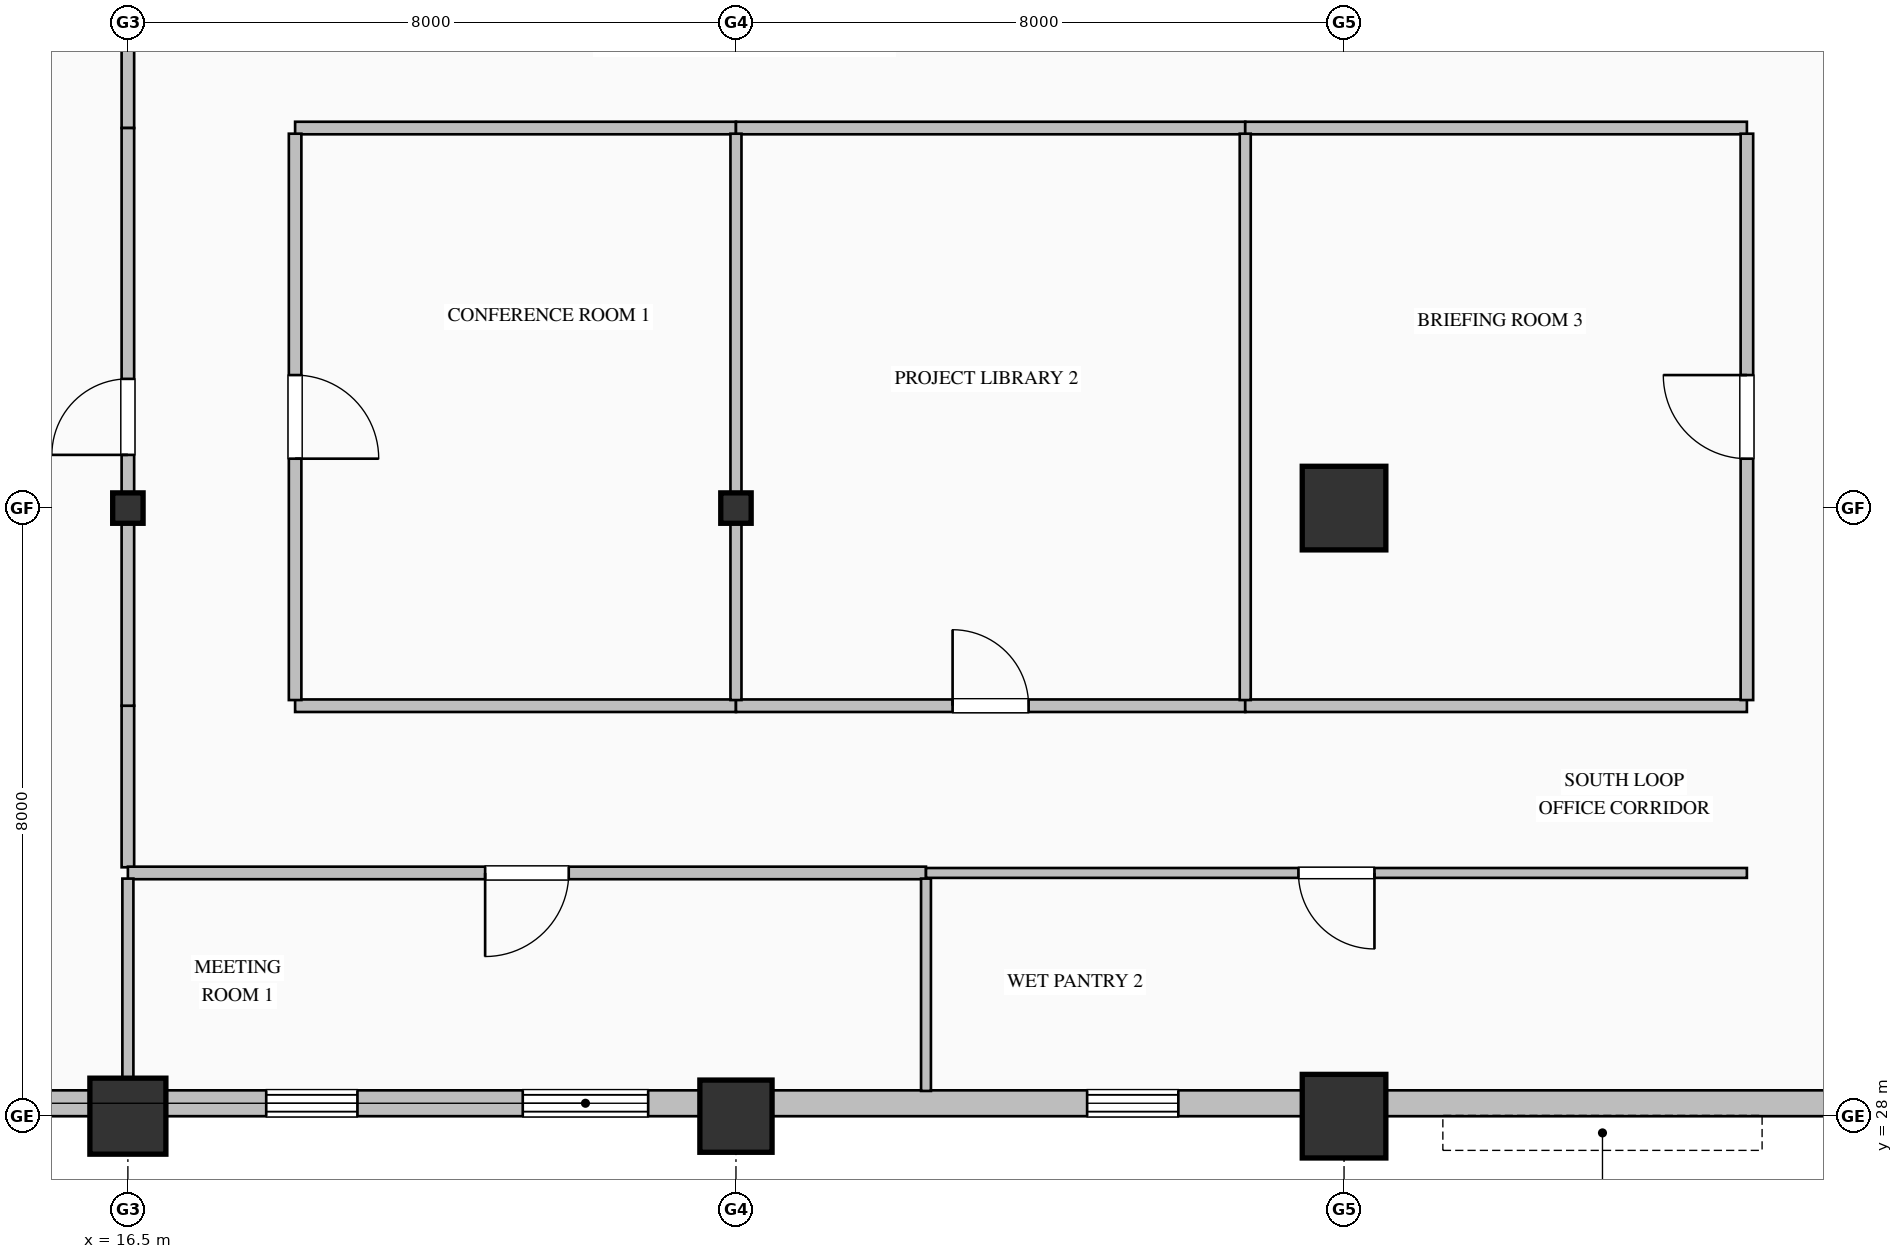
"""IFC4 building model, lengths in metres.
Left out: names, types, materials, properties, quantities, classifications, styles, units other than length and angle.
Written with IfcOpenShell. Run it as: python <this file> out.ifc"""

import sys

from ifc_helpers import new_model, si_unit, direction, frame, frame_2d, origin, origin_2d, place, context, subcontext, project, spatial, rectangle, hollow_rectangle, hollow_circle, i_section, extrude, element, fill, save


model = new_model("IFC4")
c1 = context("Model", 3, precision=1e-05, world=origin(), true_north=direction((0.0, 1.0)))
c2 = subcontext(c1, "Body", "Model", "MODEL_VIEW")
j1 = project(units=[si_unit("LENGTHUNIT", "METRE"), si_unit("PLANEANGLEUNIT", "RADIAN")], contexts=[c1])
p1 = place(None, origin())
s1 = spatial("IfcSite", under=j1, at=p1, CompositionType="ELEMENT")
p2 = place(p1, origin())
s2 = spatial("IfcBuilding", under=s1, at=p2, CompositionType="ELEMENT")
p3 = place(p2, frame((0.0, 0.0, 135.0)))
s3 = spatial("IfcBuildingStorey", under=s2, at=p3, CompositionType="ELEMENT", Elevation=135.0)
p4 = place(p3, frame((16.5, 28.0, 0.0), z_axis=(0.0, 0.0, 1.0), x_axis=(1.0, 0.0, 0.0)))
e1 = element("IfcColumn", 1, at=p4, inside=s3, PredefinedType="COLUMN", context=c2, shape_type="SweptSolid", body=[
    extrude(hollow_circle(Radius=0.5, WallThickness=0.036, at=origin_2d()), origin(), (0.0, 0.0, 1.0), 4.0),
])
p5 = place(p3, frame((16.5, 36.0, 0.0), z_axis=(0.0, 0.0, 1.0), x_axis=(1.0, 0.0, 0.0)))
e2 = element("IfcColumn", 2, at=p5, inside=s3, PredefinedType="COLUMN", context=c2, shape_type="SweptSolid", body=[
    extrude(i_section(OverallWidth=0.4, OverallDepth=0.4, WebThickness=0.013, FlangeThickness=0.021, FilletRadius=0.022, at=origin_2d()), origin(), (0.0, 0.0, 1.0), 4.0),
])
p6 = place(p3, frame((24.5, 28.0, 0.0), z_axis=(0.0, 0.0, 1.0), x_axis=(1.0, 0.0, 0.0)))
e3 = element("IfcColumn", 3, at=p6, inside=s3, PredefinedType="COLUMN", context=c2, shape_type="SweptSolid", body=[
    extrude(hollow_rectangle(XDim=0.95, YDim=0.95, WallThickness=0.036, at=origin_2d()), origin(), (0.0, 0.0, 1.0), 4.0),
])
p7 = place(p3, frame((24.5, 36.0, 0.0), z_axis=(0.0, 0.0, 1.0), x_axis=(1.0, 0.0, 0.0)))
e4 = element("IfcColumn", 4, at=p7, inside=s3, PredefinedType="COLUMN", context=c2, shape_type="SweptSolid", body=[
    extrude(i_section(OverallWidth=0.4, OverallDepth=0.4, WebThickness=0.013, FlangeThickness=0.021, FilletRadius=0.022, at=origin_2d()), origin(), (0.0, 0.0, 1.0), 4.0),
])
for number, where, z_axis, x_axis in (
    (5, (32.5, 28.0, 0.0), (0.0, 0.0, 1.0), (1.0, 0.0, 0.0)),
    (6, (32.5, 36.0, 0.0), (0.0, 0.0, 1.0), (1.0, 0.0, 0.0)),
):
    element("IfcColumn", number, at=place(p3, frame(where, z_axis=z_axis, x_axis=x_axis)), inside=s3, PredefinedType="COLUMN", context=c2, shape_type="SweptSolid", body=[
        extrude(hollow_rectangle(XDim=1.1, YDim=1.1, WallThickness=0.04, at=origin_2d()), origin(), (0.0, 0.0, 1.0), 4.0),
    ])
p8 = place(p3, frame((40.52, 28.17, 0.0), z_axis=(0.0, 0.0, 1.0), x_axis=(-1.0, 0.0, 0.0)))
e7 = element("IfcWall", 7, at=p8, inside=s3, PredefinedType="SOLIDWALL", context=c2, shape_type="SweptSolid", body=[
    extrude(rectangle(XDim=27.52, YDim=0.34, at=frame_2d((13.76, 0.0))), origin(), (0.0, 0.0, 1.0), 3.165),
])
p9 = place(p8, frame((10.2, 0.0, 0.7)))
e8 = element("IfcOpeningElement", 8, at=p9, cuts=e7, PredefinedType="OPENING", context=c2, shape_type="SweptSolid", body=[
    extrude(rectangle(XDim=1.2, YDim=1.85, at=frame_2d((0.6, 0.925))), frame((0.0, 0.18, 0.0), z_axis=(0.0, -1.0, 0.0), x_axis=(1.0, 0.0, 0.0)), (0.0, 0.0, 1.0), 0.36),
])
p10 = place(p8, frame((17.175, 0.0, 0.85)))
e9 = element("IfcOpeningElement", 9, at=p10, cuts=e7, PredefinedType="OPENING", context=c2, shape_type="SweptSolid", body=[
    extrude(rectangle(XDim=1.65, YDim=1.95, at=frame_2d((0.825, 0.975))), frame((0.0, 0.18, 0.0), z_axis=(0.0, -1.0, 0.0), x_axis=(1.0, 0.0, 0.0)), (0.0, 0.0, 1.0), 0.36),
])
p11 = place(p8, frame((21.0, 0.0, 0.7)))
e10 = element("IfcOpeningElement", 10, at=p11, cuts=e7, PredefinedType="OPENING", context=c2, shape_type="SweptSolid", body=[
    extrude(rectangle(XDim=1.2, YDim=1.85, at=frame_2d((0.6, 0.925))), frame((0.0, 0.18, 0.0), z_axis=(0.0, -1.0, 0.0), x_axis=(1.0, 0.0, 0.0)), (0.0, 0.0, 1.0), 0.36),
])
p12 = place(p3, frame((18.7, 33.4, 0.0), z_axis=(0.0, 0.0, 1.0), x_axis=(1.0, 0.0, 0.0)))
e11 = element("IfcWall", 11, at=p12, inside=s3, PredefinedType="PARTITIONING", context=c2, shape_type="SweptSolid", body=[
    extrude(rectangle(XDim=5.8, YDim=0.165, at=frame_2d((2.9, 0.0))), origin(), (0.0, 0.0, 1.0), 3.765),
])
p13 = place(p3, frame((24.5, 33.4, 0.0), z_axis=(0.0, 0.0, 1.0), x_axis=(1.0, 0.0, 0.0)))
e12 = element("IfcWall", 12, at=p13, inside=s3, PredefinedType="PARTITIONING", context=c2, shape_type="SweptSolid", body=[
    extrude(rectangle(XDim=6.7, YDim=0.165, at=frame_2d((3.35, 0.0))), origin(), (0.0, 0.0, 1.0), 3.765),
])
p14 = place(p13, frame((2.85, 0.0, 0.0)))
e13 = element("IfcOpeningElement", 13, at=p14, cuts=e12, PredefinedType="OPENING", context=c2, shape_type="SweptSolid", body=[
    extrude(rectangle(XDim=1.0, YDim=2.15, at=frame_2d((0.5, 1.075))), frame((0.0, 0.093, 0.0), z_axis=(0.0, -1.0, 0.0), x_axis=(1.0, 0.0, 0.0)), (0.0, 0.0, 1.0), 0.185),
])
p15 = place(p3, frame((31.2, 33.4, 0.0), z_axis=(0.0, 0.0, 1.0), x_axis=(1.0, 0.0, 0.0)))
e14 = element("IfcWall", 14, at=p15, inside=s3, PredefinedType="PARTITIONING", context=c2, shape_type="SweptSolid", body=[
    extrude(rectangle(XDim=6.6, YDim=0.165, at=frame_2d((3.3, 0.0))), origin(), (0.0, 0.0, 1.0), 3.765),
])
p16 = place(p3, frame((16.5, 31.274, 0.0), z_axis=(0.0, 0.0, 1.0), x_axis=(0.0, 1.0, 0.0)))
e15 = element("IfcWall", 15, at=p16, inside=s3, PredefinedType="PARTITIONING", context=c2, shape_type="SweptSolid", body=[
    extrude(rectangle(XDim=2.125, YDim=0.165, at=frame_2d((1.063, 0.0))), origin(), (0.0, 0.0, 1.0), 3.157),
])
p17 = place(p3, frame((27.0, 31.2, 0.0), z_axis=(0.0, 0.0, 1.0), x_axis=(-1.0, 0.0, 0.0)))
e16 = element("IfcWall", 16, at=p17, inside=s3, PredefinedType="PARTITIONING", context=c2, shape_type="SweptSolid", body=[
    extrude(rectangle(XDim=10.5, YDim=0.165, at=frame_2d((5.25, 0.0))), origin(), (0.0, 0.0, 1.0), 3.765),
])
p18 = place(p17, frame((4.7, 0.0, 0.0)))
e17 = element("IfcOpeningElement", 17, at=p18, cuts=e16, PredefinedType="OPENING", context=c2, shape_type="SweptSolid", body=[
    extrude(rectangle(XDim=1.1, YDim=2.2, at=frame_2d((0.55, 1.1))), frame((0.0, 0.093, 0.0), z_axis=(0.0, -1.0, 0.0), x_axis=(1.0, 0.0, 0.0)), (0.0, 0.0, 1.0), 0.185),
])
p19 = place(p3, frame((37.8, 31.2, 0.0), z_axis=(0.0, 0.0, 1.0), x_axis=(-1.0, 0.0, 0.0)))
e18 = element("IfcWall", 18, at=p19, inside=s3, PredefinedType="PARTITIONING", context=c2, shape_type="SweptSolid", body=[
    extrude(rectangle(XDim=10.8, YDim=0.13, at=frame_2d((5.4, 0.0))), origin(), (0.0, 0.0, 1.0), 3.765),
])
p20 = place(p19, frame((4.9, 0.0, 0.0)))
e19 = element("IfcOpeningElement", 19, at=p20, cuts=e18, PredefinedType="OPENING", context=c2, shape_type="SweptSolid", body=[
    extrude(rectangle(XDim=1.0, YDim=2.15, at=frame_2d((0.5, 1.075))), frame((0.0, 0.075, 0.0), z_axis=(0.0, -1.0, 0.0), x_axis=(1.0, 0.0, 0.0)), (0.0, 0.0, 1.0), 0.15),
])
p21 = place(p3, frame((24.5, 41.0, 0.0), z_axis=(0.0, 0.0, 1.0), x_axis=(-1.0, 0.0, 0.0)))
e20 = element("IfcWall", 20, at=p21, inside=s3, PredefinedType="PARTITIONING", context=c2, shape_type="SweptSolid", body=[
    extrude(rectangle(XDim=5.8, YDim=0.165, at=frame_2d((2.9, 0.0))), origin(), (0.0, 0.0, 1.0), 3.765),
])
p22 = place(p3, frame((31.2, 41.0, 0.0), z_axis=(0.0, 0.0, 1.0), x_axis=(-1.0, 0.0, 0.0)))
e21 = element("IfcWall", 21, at=p22, inside=s3, PredefinedType="PARTITIONING", context=c2, shape_type="SweptSolid", body=[
    extrude(rectangle(XDim=6.7, YDim=0.165, at=frame_2d((3.35, 0.0))), origin(), (0.0, 0.0, 1.0), 3.765),
])
p23 = place(p3, frame((37.8, 41.0, 0.0), z_axis=(0.0, 0.0, 1.0), x_axis=(-1.0, 0.0, 0.0)))
e22 = element("IfcWall", 22, at=p23, inside=s3, PredefinedType="PARTITIONING", context=c2, shape_type="SweptSolid", body=[
    extrude(rectangle(XDim=6.6, YDim=0.165, at=frame_2d((3.3, 0.0))), origin(), (0.0, 0.0, 1.0), 3.765),
])
p24 = place(p3, frame((16.5, 41.0, 0.0), z_axis=(0.0, 0.0, 1.0), x_axis=(0.0, 1.0, 0.0)))
e23 = element("IfcWall", 23, at=p24, inside=s3, PredefinedType="PARTITIONING", context=c2, shape_type="SweptSolid", body=[
    extrude(rectangle(XDim=2.125, YDim=0.165, at=frame_2d((1.063, 0.0))), origin(), (0.0, 0.0, 1.0), 3.157),
])
p25 = place(p3, frame((18.7, 40.926, 0.0), z_axis=(0.0, 0.0, 1.0), x_axis=(0.0, -1.0, 0.0)))
e24 = element("IfcWall", 24, at=p25, inside=s3, PredefinedType="PARTITIONING", context=c2, shape_type="SweptSolid", body=[
    extrude(rectangle(XDim=7.451, YDim=0.165, at=frame_2d((3.726, 0.0))), origin(), (0.0, 0.0, 1.0), 3.765),
])
p26 = place(p25, frame((3.176, 0.0, 0.0)))
e25 = element("IfcOpeningElement", 25, at=p26, cuts=e24, PredefinedType="OPENING", context=c2, shape_type="SweptSolid", body=[
    extrude(rectangle(XDim=1.1, YDim=2.2, at=frame_2d((0.55, 1.1))), frame((0.0, 0.093, 0.0), z_axis=(0.0, -1.0, 0.0), x_axis=(1.0, 0.0, 0.0)), (0.0, 0.0, 1.0), 0.185),
])
p27 = place(p3, frame((16.5, 33.4, 0.0), z_axis=(0.0, 0.0, 1.0), x_axis=(0.0, 1.0, 0.0)))
e26 = element("IfcWall", 26, at=p27, inside=s3, PredefinedType="PARTITIONING", context=c2, shape_type="SweptSolid", body=[
    extrude(rectangle(XDim=7.6, YDim=0.165, at=frame_2d((3.8, 0.0))), origin(), (0.0, 0.0, 1.0), 3.157),
])
p28 = place(p27, frame((3.3, 0.0, 0.0)))
e27 = element("IfcOpeningElement", 27, at=p28, cuts=e26, PredefinedType="OPENING", context=c2, shape_type="SweptSolid", body=[
    extrude(rectangle(XDim=1.0, YDim=2.15, at=frame_2d((0.5, 1.075))), frame((0.0, 0.093, 0.0), z_axis=(0.0, -1.0, 0.0), x_axis=(1.0, 0.0, 0.0)), (0.0, 0.0, 1.0), 0.185),
])
p29 = place(p3, frame((37.8, 33.475, 0.0), z_axis=(0.0, 0.0, 1.0), x_axis=(0.0, 1.0, 0.0)))
e28 = element("IfcWall", 28, at=p29, inside=s3, PredefinedType="PARTITIONING", context=c2, shape_type="SweptSolid", body=[
    extrude(rectangle(XDim=7.451, YDim=0.165, at=frame_2d((3.726, 0.0))), origin(), (0.0, 0.0, 1.0), 3.765),
])
p30 = place(p29, frame((3.176, 0.0, 0.0)))
e29 = element("IfcOpeningElement", 29, at=p30, cuts=e28, PredefinedType="OPENING", context=c2, shape_type="SweptSolid", body=[
    extrude(rectangle(XDim=1.1, YDim=2.2, at=frame_2d((0.55, 1.1))), frame((0.0, 0.093, 0.0), z_axis=(0.0, -1.0, 0.0), x_axis=(1.0, 0.0, 0.0)), (0.0, 0.0, 1.0), 0.185),
])
p31 = place(p3, frame((24.5, 40.926, 0.0), z_axis=(0.0, 0.0, 1.0), x_axis=(0.0, -1.0, 0.0)))
e30 = element("IfcWall", 30, at=p31, inside=s3, PredefinedType="PARTITIONING", context=c2, shape_type="SweptSolid", body=[
    extrude(rectangle(XDim=7.451, YDim=0.145, at=frame_2d((3.726, 0.0))), origin(), (0.0, 0.0, 1.0), 3.157),
])
p32 = place(p3, frame((31.2, 40.926, 0.0), z_axis=(0.0, 0.0, 1.0), x_axis=(0.0, -1.0, 0.0)))
e31 = element("IfcWall", 31, at=p32, inside=s3, PredefinedType="PARTITIONING", context=c2, shape_type="SweptSolid", body=[
    extrude(rectangle(XDim=7.451, YDim=0.145, at=frame_2d((3.726, 0.0))), origin(), (0.0, 0.0, 1.0), 3.765),
])
p33 = place(p3, frame((16.5, 31.125, 0.0), z_axis=(0.0, 0.0, 1.0), x_axis=(0.0, -1.0, 0.0)))
e32 = element("IfcWall", 32, at=p33, inside=s3, PredefinedType="PARTITIONING", context=c2, shape_type="SweptSolid", body=[
    extrude(rectangle(XDim=2.793, YDim=0.145, at=frame_2d((1.397, 0.0))), origin(), (0.0, 0.0, 1.0), 3.157),
])
p34 = place(p3, frame((27.0, 31.125, 0.0), z_axis=(0.0, 0.0, 1.0), x_axis=(0.0, -1.0, 0.0)))
e33 = element("IfcWall", 33, at=p34, inside=s3, PredefinedType="PARTITIONING", context=c2, shape_type="SweptSolid", body=[
    extrude(rectangle(XDim=2.793, YDim=0.13, at=frame_2d((1.397, 0.0))), origin(), (0.0, 0.0, 1.0), 3.765),
])
p35 = place(p9, origin())
e34 = element("IfcWindow", 34, at=p35, inside=s3, PartitioningType="DOUBLE_PANEL_VERTICAL", PredefinedType="WINDOW", context=c2, shape_type="SweptSolid", body=[
    extrude(rectangle(XDim=1.2, YDim=1.85, at=frame_2d((0.6, 0.925))), frame((0.0, 0.15, 0.0), z_axis=(0.0, -1.0, 0.0), x_axis=(1.0, 0.0, 0.0)), (0.0, 0.0, 1.0), 0.06),
])
fill(e8, e34)
p36 = place(p10, origin())
e35 = element("IfcWindow", 35, at=p36, inside=s3, PartitioningType="DOUBLE_PANEL_VERTICAL", PredefinedType="WINDOW", context=c2, shape_type="SweptSolid", body=[
    extrude(rectangle(XDim=1.65, YDim=1.95, at=frame_2d((0.825, 0.975))), frame((0.0, 0.15, 0.0), z_axis=(0.0, -1.0, 0.0), x_axis=(1.0, 0.0, 0.0)), (0.0, 0.0, 1.0), 0.06),
])
fill(e9, e35)
p37 = place(p11, origin())
e36 = element("IfcWindow", 36, at=p37, inside=s3, PartitioningType="DOUBLE_PANEL_VERTICAL", PredefinedType="WINDOW", context=c2, shape_type="SweptSolid", body=[
    extrude(rectangle(XDim=1.2, YDim=1.85, at=frame_2d((0.6, 0.925))), frame((0.0, 0.15, 0.0), z_axis=(0.0, -1.0, 0.0), x_axis=(1.0, 0.0, 0.0)), (0.0, 0.0, 1.0), 0.06),
])
fill(e10, e36)
p38 = place(p26, origin())
e37 = element("IfcDoor", 37, at=p38, inside=s3, OperationType="SINGLE_SWING_RIGHT", PredefinedType="DOOR", context=c2, shape_type="SweptSolid", body=[
    extrude(rectangle(XDim=1.1, YDim=2.2, at=frame_2d((0.55, 1.1))), frame((0.0, 0.025, 0.0), z_axis=(0.0, -1.0, 0.0), x_axis=(1.0, 0.0, 0.0)), (0.0, 0.0, 1.0), 0.05),
])
fill(e25, e37)
p39 = place(p14, origin())
e38 = element("IfcDoor", 38, at=p39, inside=s3, OperationType="SINGLE_SWING_LEFT", PredefinedType="DOOR", context=c2, shape_type="SweptSolid", body=[
    extrude(rectangle(XDim=1.0, YDim=2.15, at=frame_2d((0.5, 1.075))), frame((0.0, 0.025, 0.0), z_axis=(0.0, -1.0, 0.0), x_axis=(1.0, 0.0, 0.0)), (0.0, 0.0, 1.0), 0.05),
])
fill(e13, e38)
p40 = place(p30, origin())
e39 = element("IfcDoor", 39, at=p40, inside=s3, OperationType="SINGLE_SWING_RIGHT", PredefinedType="DOOR", context=c2, shape_type="SweptSolid", body=[
    extrude(rectangle(XDim=1.1, YDim=2.2, at=frame_2d((0.55, 1.1))), frame((0.0, 0.025, 0.0), z_axis=(0.0, -1.0, 0.0), x_axis=(1.0, 0.0, 0.0)), (0.0, 0.0, 1.0), 0.05),
])
fill(e29, e39)
p41 = place(p28, origin())
e40 = element("IfcDoor", 40, at=p41, inside=s3, OperationType="SINGLE_SWING_LEFT", PredefinedType="DOOR", context=c2, shape_type="SweptSolid", body=[
    extrude(rectangle(XDim=1.0, YDim=2.15, at=frame_2d((0.5, 1.075))), frame((0.0, 0.025, 0.0), z_axis=(0.0, -1.0, 0.0), x_axis=(1.0, 0.0, 0.0)), (0.0, 0.0, 1.0), 0.05),
])
fill(e27, e40)
p42 = place(p18, origin())
e41 = element("IfcDoor", 41, at=p42, inside=s3, OperationType="SINGLE_SWING_RIGHT", PredefinedType="DOOR", context=c2, shape_type="SweptSolid", body=[
    extrude(rectangle(XDim=1.1, YDim=2.2, at=frame_2d((0.55, 1.1))), frame((0.0, 0.025, 0.0), z_axis=(0.0, -1.0, 0.0), x_axis=(1.0, 0.0, 0.0)), (0.0, 0.0, 1.0), 0.05),
])
fill(e17, e41)
p43 = place(p20, origin())
e42 = element("IfcDoor", 42, at=p43, inside=s3, OperationType="SINGLE_SWING_LEFT", PredefinedType="DOOR", context=c2, shape_type="SweptSolid", body=[
    extrude(rectangle(XDim=1.0, YDim=2.15, at=frame_2d((0.5, 1.075))), frame((0.0, 0.025, 0.0), z_axis=(0.0, -1.0, 0.0), x_axis=(1.0, 0.0, 0.0)), (0.0, 0.0, 1.0), 0.05),
])
fill(e19, e42)
save(model, sys.argv[1])
